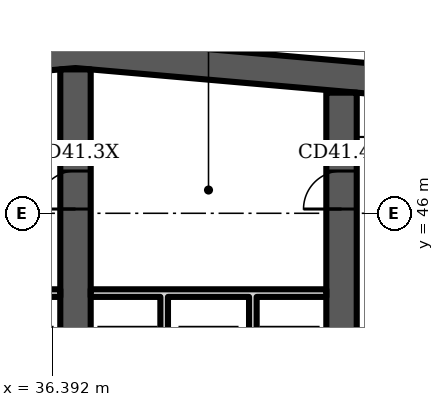
"""IFC4 building model, lengths in metres.
Left out: names, types, materials, properties, quantities, classifications, styles, units other than length and angle.
Written with IfcOpenShell. Run it as: python <this file> out.ifc"""

import sys

from ifc_helpers import new_model, si_unit, direction, frame, frame_2d, origin, place, context, subcontext, project, spatial, polyline, rectangle, outline, extrude, element, fill, save


model = new_model("IFC4")
c1 = context("Model", 3, precision=1e-05, world=origin(), true_north=direction((0.0, 1.0)))
c2 = subcontext(c1, "Body", "Model", "MODEL_VIEW")
j1 = project(units=[si_unit("LENGTHUNIT", "METRE"), si_unit("PLANEANGLEUNIT", "RADIAN")], contexts=[c1])
p1 = place(None, origin())
s1 = spatial("IfcSite", under=j1, at=p1, CompositionType="ELEMENT")
p2 = place(p1, origin())
s2 = spatial("IfcBuilding", under=s1, at=p2, CompositionType="ELEMENT")
p3 = place(p2, frame((0.0, 0.0, 169.9)))
s3 = spatial("IfcBuildingStorey", under=s2, at=p3, CompositionType="ELEMENT", Elevation=169.9)
p4 = place(p3, origin())
e1 = element("IfcWall", 1, at=p4, inside=s3, PredefinedType="SHEAR", context=c2, shape_type="SweptSolid", body=[
    extrude(outline(polyline([(16.0, 47.984), (37.0, 49.822), (58.0, 47.984), (58.0, 48.787), (37.0, 50.625), (16.0, 48.787), (16.0, 47.984)])), origin(), (0.0, 0.0, 1.0), 3.6),
])
p5 = place(p3, frame((37.0, 34.8, 0.0), z_axis=(0.0, 0.0, 1.0), x_axis=(0.0, 1.0, 0.0)))
e2 = element("IfcWall", 2, at=p5, inside=s3, PredefinedType="SHEAR", context=c2, shape_type="SweptSolid", body=[
    extrude(rectangle(XDim=14.987, YDim=0.8, at=frame_2d((7.493, 0.0))), origin(), (0.0, 0.0, 1.0), 3.6),
])
p6 = place(p5, frame((11.312, 0.0, 0.0)))
e3 = element("IfcOpeningElement", 3, at=p6, cuts=e2, PredefinedType="OPENING", context=c2, shape_type="SweptSolid", body=[
    extrude(rectangle(XDim=1.0, YDim=2.1, at=frame_2d((0.5, 1.05))), frame((0.0, 0.41, 0.0), z_axis=(0.0, -1.0, 0.0), x_axis=(1.0, 0.0, 0.0)), (0.0, 0.0, 1.0), 0.82),
])
p7 = place(p5, frame((3.6, 0.0, 0.0)))
e4 = element("IfcOpeningElement", 4, at=p7, cuts=e2, PredefinedType="OPENING", context=c2, shape_type="SweptSolid", body=[
    extrude(rectangle(XDim=1.1, YDim=2.1, at=frame_2d((0.55, 1.05))), frame((0.0, 0.41, 0.0), z_axis=(0.0, -1.0, 0.0), x_axis=(1.0, 0.0, 0.0)), (0.0, 0.0, 1.0), 0.82),
])
p8 = place(p3, frame((44.0, 34.8, 0.0), z_axis=(0.0, 0.0, 1.0), x_axis=(0.0, 1.0, 0.0)))
e5 = element("IfcWall", 5, at=p8, inside=s3, PredefinedType="SHEAR", context=c2, shape_type="SweptSolid", body=[
    extrude(rectangle(XDim=14.374, YDim=0.8, at=frame_2d((7.187, 0.0))), origin(), (0.0, 0.0, 1.0), 3.6),
])
p9 = place(p8, frame((11.312, 0.0, 0.0)))
e6 = element("IfcOpeningElement", 6, at=p9, cuts=e5, PredefinedType="OPENING", context=c2, shape_type="SweptSolid", body=[
    extrude(rectangle(XDim=1.0, YDim=2.1, at=frame_2d((0.5, 1.05))), frame((0.0, 0.41, 0.0), z_axis=(0.0, -1.0, 0.0), x_axis=(1.0, 0.0, 0.0)), (0.0, 0.0, 1.0), 0.82),
])
p10 = place(p8, frame((3.6, 0.0, 0.0)))
e7 = element("IfcOpeningElement", 7, at=p10, cuts=e5, PredefinedType="OPENING", context=c2, shape_type="SweptSolid", body=[
    extrude(rectangle(XDim=1.1, YDim=2.1, at=frame_2d((0.55, 1.05))), frame((0.0, 0.41, 0.0), z_axis=(0.0, -1.0, 0.0), x_axis=(1.0, 0.0, 0.0)), (0.0, 0.0, 1.0), 0.82),
])
p11 = place(p3, origin())
e8 = element("IfcWall", 8, at=p11, inside=s3, PredefinedType="PARTITIONING", context=c2, shape_type="SweptSolid", body=[
    extrude(outline(polyline([(32.433, 40.8), (32.233, 40.8), (32.233, 43.8), (30.4, 43.8), (30.4, 44.0), (36.6, 44.0), (36.6, 43.8), (34.767, 43.8), (34.767, 40.8), (34.567, 40.8), (34.567, 43.8), (32.433, 43.8), (32.433, 40.8)])), origin(), (0.0, 0.0, 1.0), 3.2),
])
p12 = place(p3, origin())
e9 = element("IfcWall", 9, at=p12, inside=s3, PredefinedType="PARTITIONING", context=c2, shape_type="SweptSolid", body=[
    extrude(outline(polyline([(39.433, 40.8), (39.233, 40.8), (39.233, 43.8), (37.4, 43.8), (37.4, 44.0), (43.6, 44.0), (43.6, 43.8), (41.767, 43.8), (41.767, 40.8), (41.567, 40.8), (41.567, 43.8), (39.433, 43.8), (39.433, 40.8)])), origin(), (0.0, 0.0, 1.0), 3.2),
])
p13 = place(p6, origin())
e10 = element("IfcDoor", 10, at=p13, inside=s3, OperationType="SINGLE_SWING_LEFT", PredefinedType="DOOR", context=c2, shape_type="SweptSolid", body=[
    extrude(rectangle(XDim=1.0, YDim=2.1, at=frame_2d((0.5, 1.05))), frame((0.0, 0.4, 0.0), z_axis=(0.0, -1.0, 0.0), x_axis=(1.0, 0.0, 0.0)), (0.0, 0.0, 1.0), 0.8),
])
fill(e3, e10)
p14 = place(p9, origin())
e11 = element("IfcDoor", 11, at=p14, inside=s3, OperationType="SINGLE_SWING_LEFT", PredefinedType="DOOR", context=c2, shape_type="SweptSolid", body=[
    extrude(rectangle(XDim=1.0, YDim=2.1, at=frame_2d((0.5, 1.05))), frame((0.0, 0.4, 0.0), z_axis=(0.0, -1.0, 0.0), x_axis=(1.0, 0.0, 0.0)), (0.0, 0.0, 1.0), 0.8),
])
fill(e6, e11)
save(model, sys.argv[1])
